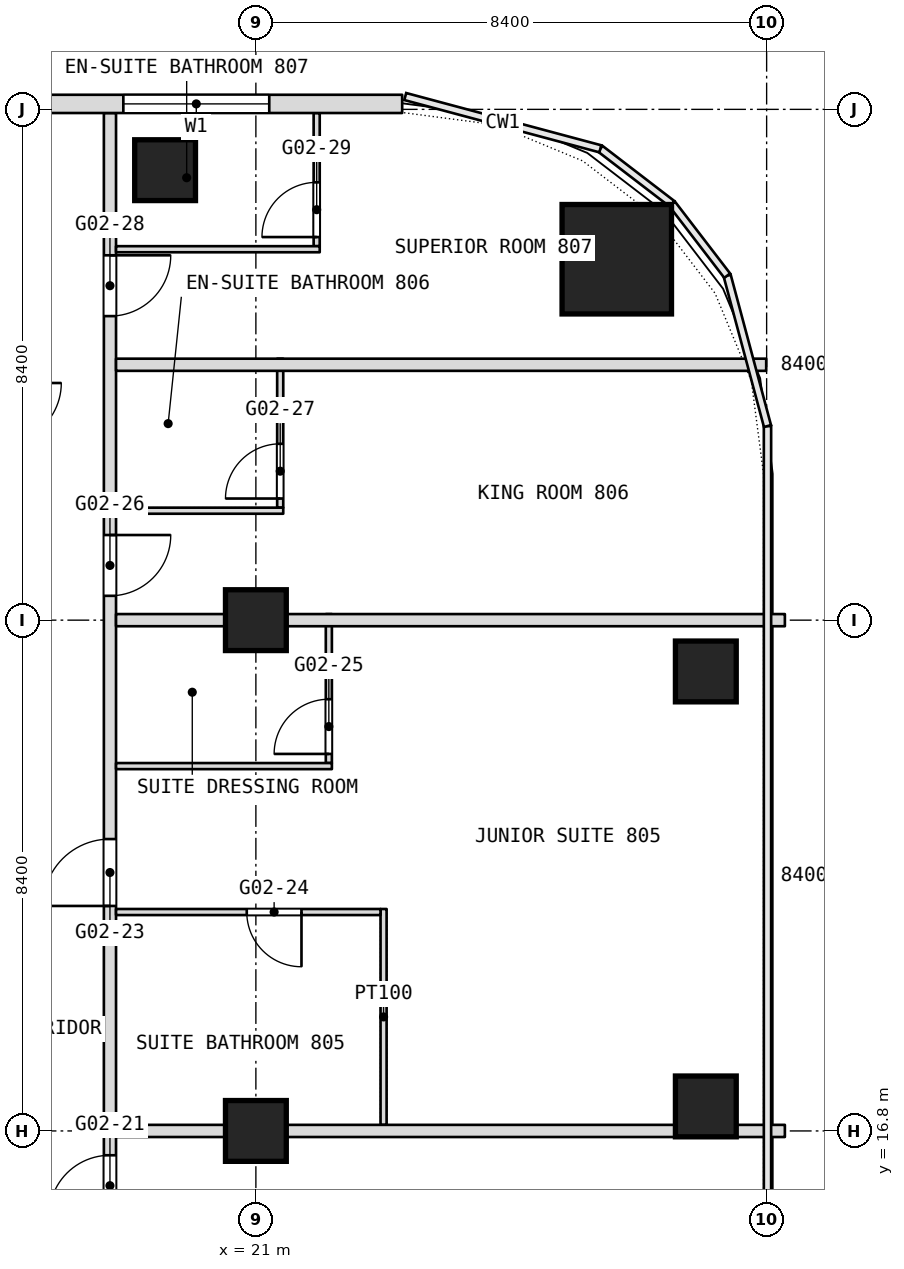
"""IFC4 building model, lengths in metres.
Left out: names, types, materials, properties, quantities, classifications, styles, units other than length and angle.
Written with IfcOpenShell. Run it as: python <this file> out.ifc"""

import sys

from ifc_helpers import new_model, si_unit, direction, frame, frame_2d, origin, origin_2d, place, context, subcontext, project, spatial, rectangle, extrude, element, fill, save


model = new_model("IFC4")
c1 = context("Model", 3, precision=1e-05, world=origin(), true_north=direction((0.0, 1.0)))
c2 = subcontext(c1, "Body", "Model", "MODEL_VIEW")
j1 = project(units=[si_unit("LENGTHUNIT", "METRE"), si_unit("PLANEANGLEUNIT", "RADIAN")], contexts=[c1])
p1 = place(None, origin())
s1 = spatial("IfcSite", under=j1, at=p1, CompositionType="ELEMENT")
p2 = place(p1, origin())
s2 = spatial("IfcBuilding", under=s1, at=p2, CompositionType="ELEMENT")
p3 = place(p2, frame((0.0, 0.0, 43.7)))
s3 = spatial("IfcBuildingStorey", under=s2, at=p3, CompositionType="ELEMENT", Elevation=43.7)
p4 = place(p3, frame((26.936, 31.135, 0.0), z_axis=(0.0, 0.0, 1.0), x_axis=(1.0, 0.0, 0.0)))
e1 = element("IfcColumn", 1, at=p4, inside=s3, PredefinedType="COLUMN", context=c2, shape_type="SweptSolid", body=[
    extrude(rectangle(XDim=1.8, YDim=1.8, at=origin_2d()), origin(), (0.0, 0.0, 1.0), 3.6),
])
for number, where, z_axis, x_axis in (
    (2, (21.0, 16.8, 0.0), (0.0, 0.0, 1.0), (1.0, 0.0, 0.0)),
    (3, (21.0, 25.2, 0.0), (0.0, 0.0, 1.0), (1.0, 0.0, 0.0)),
    (4, (19.507, 32.6, 0.0), (0.0, 0.0, 1.0), (1.0, 0.0, 0.0)),
    (5, (28.4, 24.356, 0.0), (0.0, 0.0, 1.0), (1.0, 0.0, 0.0)),
    (6, (28.4, 17.203, 0.0), (0.0, 0.0, 1.0), (1.0, 0.0, 0.0)),
):
    element("IfcColumn", number, at=place(p3, frame(where, z_axis=z_axis, x_axis=x_axis)), inside=s3, PredefinedType="COLUMN", context=c2, shape_type="SweptSolid", body=[
        extrude(rectangle(XDim=1.0, YDim=1.0, at=origin_2d()), origin(), (0.0, 0.0, 1.0), 3.6),
    ])
p5 = place(p3, frame((23.1, 16.9, 0.0), z_axis=(0.0, 0.0, 1.0), x_axis=(0.0, 1.0, 0.0)))
e7 = element("IfcWall", 7, at=p5, inside=s3, PredefinedType="PARTITIONING", context=c2, shape_type="SweptSolid", body=[
    extrude(rectangle(XDim=3.55, YDim=0.1, at=frame_2d((1.775, 0.0))), origin(), (0.0, 0.0, 1.0), 3.34),
])
p6 = place(p3, frame((22.2, 22.85, 0.0), z_axis=(0.0, 0.0, 1.0), x_axis=(0.0, 1.0, 0.0)))
e8 = element("IfcWall", 8, at=p6, inside=s3, PredefinedType="PARTITIONING", context=c2, shape_type="SweptSolid", body=[
    extrude(rectangle(XDim=2.45, YDim=0.1, at=frame_2d((1.225, 0.0))), origin(), (0.0, 0.0, 1.0), 3.34),
])
p7 = place(p6, frame((0.15, 0.0, 0.0)))
e9 = element("IfcOpeningElement", 9, at=p7, cuts=e8, PredefinedType="OPENING", context=c2, shape_type="SweptSolid", body=[
    extrude(rectangle(XDim=0.9, YDim=2.1, at=frame_2d((0.45, 1.05))), frame((0.0, 0.05, 0.0), z_axis=(0.0, -1.0, 0.0), x_axis=(1.0, 0.0, 0.0)), (0.0, 0.0, 1.0), 0.1),
])
p8 = place(p3, frame((22.0, 31.35, 0.0), z_axis=(0.0, 0.0, 1.0), x_axis=(0.0, 1.0, 0.0)))
e10 = element("IfcWall", 10, at=p8, inside=s3, PredefinedType="PARTITIONING", context=c2, shape_type="SweptSolid", body=[
    extrude(rectangle(XDim=2.19, YDim=0.1, at=frame_2d((1.095, 0.0))), origin(), (0.0, 0.0, 1.0), 3.34),
])
p9 = place(p8, frame((0.15, 0.0, 0.0)))
e11 = element("IfcOpeningElement", 11, at=p9, cuts=e10, PredefinedType="OPENING", context=c2, shape_type="SweptSolid", body=[
    extrude(rectangle(XDim=0.9, YDim=2.1, at=frame_2d((0.45, 1.05))), frame((0.0, 0.05, 0.0), z_axis=(0.0, -1.0, 0.0), x_axis=(1.0, 0.0, 0.0)), (0.0, 0.0, 1.0), 0.1),
])
p10 = place(p3, frame((21.4, 27.05, 0.0), z_axis=(0.0, 0.0, 1.0), x_axis=(0.0, 1.0, 0.0)))
e12 = element("IfcWall", 12, at=p10, inside=s3, PredefinedType="PARTITIONING", context=c2, shape_type="SweptSolid", body=[
    extrude(rectangle(XDim=2.45, YDim=0.1, at=frame_2d((1.225, 0.0))), origin(), (0.0, 0.0, 1.0), 3.34),
])
p11 = place(p10, frame((0.15, 0.0, 0.0)))
e13 = element("IfcOpeningElement", 13, at=p11, cuts=e12, PredefinedType="OPENING", context=c2, shape_type="SweptSolid", body=[
    extrude(rectangle(XDim=0.9, YDim=2.1, at=frame_2d((0.45, 1.05))), frame((0.0, 0.05, 0.0), z_axis=(0.0, -1.0, 0.0), x_axis=(1.0, 0.0, 0.0)), (0.0, 0.0, 1.0), 0.1),
])
p12 = place(p3, frame((18.6, -16.665, 0.0), z_axis=(0.0, 0.0, 1.0), x_axis=(0.0, 1.0, 0.0)))
e14 = element("IfcWall", 14, at=p12, inside=s3, PredefinedType="PARTITIONING", context=c2, shape_type="SweptSolid", body=[
    extrude(rectangle(XDim=50.205, YDim=0.2, at=frame_2d((25.103, 0.0))), origin(), (0.0, 0.0, 1.0), 3.34),
])
p13 = place(p12, frame((4.0, 0.0, 0.0)))
e15 = element("IfcOpeningElement", 15, at=p13, cuts=e14, PredefinedType="OPENING", context=c2, shape_type="SweptSolid", body=[
    extrude(rectangle(XDim=1.1, YDim=2.1, at=frame_2d((0.55, 1.05))), frame((0.0, 0.1, 0.0), z_axis=(0.0, -1.0, 0.0), x_axis=(1.0, 0.0, 0.0)), (0.0, 0.0, 1.0), 0.2),
])
p14 = place(p12, frame((9.815, 0.0, 0.0)))
e16 = element("IfcOpeningElement", 16, at=p14, cuts=e14, PredefinedType="OPENING", context=c2, shape_type="SweptSolid", body=[
    extrude(rectangle(XDim=1.1, YDim=2.1, at=frame_2d((0.55, 1.05))), frame((0.0, 0.1, 0.0), z_axis=(0.0, -1.0, 0.0), x_axis=(1.0, 0.0, 0.0)), (0.0, 0.0, 1.0), 0.2),
])
p15 = place(p12, frame((19.965, 0.0, 0.0)))
e17 = element("IfcOpeningElement", 17, at=p15, cuts=e14, PredefinedType="OPENING", context=c2, shape_type="SweptSolid", body=[
    extrude(rectangle(XDim=1.8, YDim=2.1, at=frame_2d((0.9, 1.05))), frame((0.0, 0.1, 0.0), z_axis=(0.0, -1.0, 0.0), x_axis=(1.0, 0.0, 0.0)), (0.0, 0.0, 1.0), 0.2),
])
p16 = place(p12, frame((25.465, 0.0, 0.0)))
e18 = element("IfcOpeningElement", 18, at=p16, cuts=e14, PredefinedType="OPENING", context=c2, shape_type="SweptSolid", body=[
    extrude(rectangle(XDim=1.0, YDim=2.1, at=frame_2d((0.5, 1.05))), frame((0.0, 0.1, 0.0), z_axis=(0.0, -1.0, 0.0), x_axis=(1.0, 0.0, 0.0)), (0.0, 0.0, 1.0), 0.2),
])
p17 = place(p12, frame((32.065, 0.0, 0.0)))
e19 = element("IfcOpeningElement", 19, at=p17, cuts=e14, PredefinedType="OPENING", context=c2, shape_type="SweptSolid", body=[
    extrude(rectangle(XDim=1.0, YDim=2.1, at=frame_2d((0.5, 1.05))), frame((0.0, 0.1, 0.0), z_axis=(0.0, -1.0, 0.0), x_axis=(1.0, 0.0, 0.0)), (0.0, 0.0, 1.0), 0.2),
])
p18 = place(p12, frame((37.165, 0.0, 0.0)))
e20 = element("IfcOpeningElement", 20, at=p18, cuts=e14, PredefinedType="OPENING", context=c2, shape_type="SweptSolid", body=[
    extrude(rectangle(XDim=1.1, YDim=2.1, at=frame_2d((0.55, 1.05))), frame((0.0, 0.1, 0.0), z_axis=(0.0, -1.0, 0.0), x_axis=(1.0, 0.0, 0.0)), (0.0, 0.0, 1.0), 0.2),
])
p19 = place(p12, frame((42.265, 0.0, 0.0)))
e21 = element("IfcOpeningElement", 21, at=p19, cuts=e14, PredefinedType="OPENING", context=c2, shape_type="SweptSolid", body=[
    extrude(rectangle(XDim=1.0, YDim=2.1, at=frame_2d((0.5, 1.05))), frame((0.0, 0.1, 0.0), z_axis=(0.0, -1.0, 0.0), x_axis=(1.0, 0.0, 0.0)), (0.0, 0.0, 1.0), 0.2),
])
p20 = place(p12, frame((46.865, 0.0, 0.0)))
e22 = element("IfcOpeningElement", 22, at=p20, cuts=e14, PredefinedType="OPENING", context=c2, shape_type="SweptSolid", body=[
    extrude(rectangle(XDim=1.0, YDim=2.1, at=frame_2d((0.5, 1.05))), frame((0.0, 0.1, 0.0), z_axis=(0.0, -1.0, 0.0), x_axis=(1.0, 0.0, 0.0)), (0.0, 0.0, 1.0), 0.2),
])
p21 = place(p3, frame((18.7, 16.8, 0.0), z_axis=(0.0, 0.0, 1.0), x_axis=(1.0, 0.0, 0.0)))
e23 = element("IfcWall", 23, at=p21, inside=s3, PredefinedType="PARTITIONING", context=c2, shape_type="SweptSolid", body=[
    extrude(rectangle(XDim=11.0, YDim=0.2, at=frame_2d((5.5, 0.0))), origin(), (0.0, 0.0, 1.0), 2.84),
])
p22 = place(p3, frame((18.7, 20.4, 0.0), z_axis=(0.0, 0.0, 1.0), x_axis=(1.0, 0.0, 0.0)))
e24 = element("IfcWall", 24, at=p22, inside=s3, PredefinedType="PARTITIONING", context=c2, shape_type="SweptSolid", body=[
    extrude(rectangle(XDim=4.35, YDim=0.1, at=frame_2d((2.175, 0.0))), origin(), (0.0, 0.0, 1.0), 3.34),
])
p23 = place(p22, frame((2.15, 0.0, 0.0)))
e25 = element("IfcOpeningElement", 25, at=p23, cuts=e24, PredefinedType="OPENING", context=c2, shape_type="SweptSolid", body=[
    extrude(rectangle(XDim=0.9, YDim=2.1, at=frame_2d((0.45, 1.05))), frame((0.0, 0.05, 0.0), z_axis=(0.0, -1.0, 0.0), x_axis=(1.0, 0.0, 0.0)), (0.0, 0.0, 1.0), 0.1),
])
p24 = place(p3, frame((18.7, 22.8, 0.0), z_axis=(0.0, 0.0, 1.0), x_axis=(1.0, 0.0, 0.0)))
e26 = element("IfcWall", 26, at=p24, inside=s3, PredefinedType="PARTITIONING", context=c2, shape_type="SweptSolid", body=[
    extrude(rectangle(XDim=3.55, YDim=0.1, at=frame_2d((1.775, 0.0))), origin(), (0.0, 0.0, 1.0), 3.34),
])
p25 = place(p3, frame((18.7, 25.2, 0.0), z_axis=(0.0, 0.0, 1.0), x_axis=(1.0, 0.0, 0.0)))
e27 = element("IfcWall", 27, at=p25, inside=s3, PredefinedType="PARTITIONING", context=c2, shape_type="SweptSolid", body=[
    extrude(rectangle(XDim=11.0, YDim=0.2, at=frame_2d((5.5, 0.0))), origin(), (0.0, 0.0, 1.0), 2.84),
])
p26 = place(p3, frame((18.7, 27.0, 0.0), z_axis=(0.0, 0.0, 1.0), x_axis=(1.0, 0.0, 0.0)))
e28 = element("IfcWall", 28, at=p26, inside=s3, PredefinedType="PARTITIONING", context=c2, shape_type="SweptSolid", body=[
    extrude(rectangle(XDim=2.75, YDim=0.1, at=frame_2d((1.375, 0.0))), origin(), (0.0, 0.0, 1.0), 3.34),
])
p27 = place(p3, frame((18.7, 29.4, 0.0), z_axis=(0.0, 0.0, 1.0), x_axis=(1.0, 0.0, 0.0)))
e29 = element("IfcWall", 29, at=p27, inside=s3, PredefinedType="PARTITIONING", context=c2, shape_type="SweptSolid", body=[
    extrude(rectangle(XDim=10.693, YDim=0.2, at=frame_2d((5.347, 0.0))), origin(), (0.0, 0.0, 1.0), 3.34),
])
p28 = place(p3, frame((18.7, 31.3, 0.0), z_axis=(0.0, 0.0, 1.0), x_axis=(1.0, 0.0, 0.0)))
e30 = element("IfcWall", 30, at=p28, inside=s3, PredefinedType="PARTITIONING", context=c2, shape_type="SweptSolid", body=[
    extrude(rectangle(XDim=3.35, YDim=0.1, at=frame_2d((1.675, 0.0))), origin(), (0.0, 0.0, 1.0), 3.34),
])
p29 = place(p3, frame((23.406, 33.69, 0.0), z_axis=(0.0, 0.0, 1.0), x_axis=(-1.0, 0.0, 0.0)))
e31 = element("IfcWall", 31, at=p29, inside=s3, PredefinedType="NOTDEFINED", context=c2, shape_type="SweptSolid", body=[
    extrude(rectangle(XDim=46.812, YDim=0.3, at=frame_2d((23.406, 0.0))), origin(), (0.0, 0.0, 1.0), 3.6),
])
p30 = place(p29, frame((2.186, 0.0, 0.9)))
e32 = element("IfcOpeningElement", 32, at=p30, cuts=e31, PredefinedType="OPENING", context=c2, shape_type="SweptSolid", body=[
    extrude(rectangle(XDim=2.4, YDim=2.1, at=frame_2d((1.2, 1.05))), frame((0.0, 0.15, 0.0), z_axis=(0.0, -1.0, 0.0), x_axis=(1.0, 0.0, 0.0)), (0.0, 0.0, 1.0), 0.3),
])
p31 = place(p29, frame((7.506, 0.0, 0.9)))
e33 = element("IfcOpeningElement", 33, at=p31, cuts=e31, PredefinedType="OPENING", context=c2, shape_type="SweptSolid", body=[
    extrude(rectangle(XDim=2.4, YDim=2.1, at=frame_2d((1.2, 1.05))), frame((0.0, 0.15, 0.0), z_axis=(0.0, -1.0, 0.0), x_axis=(1.0, 0.0, 0.0)), (0.0, 0.0, 1.0), 0.3),
])
p32 = place(p29, frame((11.706, 0.0, 0.9)))
e34 = element("IfcOpeningElement", 34, at=p32, cuts=e31, PredefinedType="OPENING", context=c2, shape_type="SweptSolid", body=[
    extrude(rectangle(XDim=2.4, YDim=2.1, at=frame_2d((1.2, 1.05))), frame((0.0, 0.15, 0.0), z_axis=(0.0, -1.0, 0.0), x_axis=(1.0, 0.0, 0.0)), (0.0, 0.0, 1.0), 0.3),
])
p33 = place(p29, frame((15.906, 0.0, 0.9)))
e35 = element("IfcOpeningElement", 35, at=p33, cuts=e31, PredefinedType="OPENING", context=c2, shape_type="SweptSolid", body=[
    extrude(rectangle(XDim=2.4, YDim=2.1, at=frame_2d((1.2, 1.05))), frame((0.0, 0.15, 0.0), z_axis=(0.0, -1.0, 0.0), x_axis=(1.0, 0.0, 0.0)), (0.0, 0.0, 1.0), 0.3),
])
p34 = place(p29, frame((20.106, 0.0, 0.9)))
e36 = element("IfcOpeningElement", 36, at=p34, cuts=e31, PredefinedType="OPENING", context=c2, shape_type="SweptSolid", body=[
    extrude(rectangle(XDim=2.4, YDim=2.1, at=frame_2d((1.2, 1.05))), frame((0.0, 0.15, 0.0), z_axis=(0.0, -1.0, 0.0), x_axis=(1.0, 0.0, 0.0)), (0.0, 0.0, 1.0), 0.3),
])
p35 = place(p29, frame((24.306, 0.0, 0.9)))
e37 = element("IfcOpeningElement", 37, at=p35, cuts=e31, PredefinedType="OPENING", context=c2, shape_type="SweptSolid", body=[
    extrude(rectangle(XDim=2.4, YDim=2.1, at=frame_2d((1.2, 1.05))), frame((0.0, 0.15, 0.0), z_axis=(0.0, -1.0, 0.0), x_axis=(1.0, 0.0, 0.0)), (0.0, 0.0, 1.0), 0.3),
])
p36 = place(p29, frame((28.506, 0.0, 0.9)))
e38 = element("IfcOpeningElement", 38, at=p36, cuts=e31, PredefinedType="OPENING", context=c2, shape_type="SweptSolid", body=[
    extrude(rectangle(XDim=2.4, YDim=2.1, at=frame_2d((1.2, 1.05))), frame((0.0, 0.15, 0.0), z_axis=(0.0, -1.0, 0.0), x_axis=(1.0, 0.0, 0.0)), (0.0, 0.0, 1.0), 0.3),
])
p37 = place(p29, frame((32.706, 0.0, 0.9)))
e39 = element("IfcOpeningElement", 39, at=p37, cuts=e31, PredefinedType="OPENING", context=c2, shape_type="SweptSolid", body=[
    extrude(rectangle(XDim=2.4, YDim=2.1, at=frame_2d((1.2, 1.05))), frame((0.0, 0.15, 0.0), z_axis=(0.0, -1.0, 0.0), x_axis=(1.0, 0.0, 0.0)), (0.0, 0.0, 1.0), 0.3),
])
p38 = place(p29, frame((36.906, 0.0, 0.9)))
e40 = element("IfcOpeningElement", 40, at=p38, cuts=e31, PredefinedType="OPENING", context=c2, shape_type="SweptSolid", body=[
    extrude(rectangle(XDim=2.4, YDim=2.1, at=frame_2d((1.2, 1.05))), frame((0.0, 0.15, 0.0), z_axis=(0.0, -1.0, 0.0), x_axis=(1.0, 0.0, 0.0)), (0.0, 0.0, 1.0), 0.3),
])
p39 = place(p29, frame((42.226, 0.0, 0.9)))
e41 = element("IfcOpeningElement", 41, at=p39, cuts=e31, PredefinedType="OPENING", context=c2, shape_type="SweptSolid", body=[
    extrude(rectangle(XDim=2.4, YDim=2.1, at=frame_2d((1.2, 1.05))), frame((0.0, 0.15, 0.0), z_axis=(0.0, -1.0, 0.0), x_axis=(1.0, 0.0, 0.0)), (0.0, 0.0, 1.0), 0.3),
])
p40 = place(p7, origin())
e42 = element("IfcDoor", 42, at=p40, inside=s3, OperationType="SINGLE_SWING_LEFT", PredefinedType="DOOR", context=c2, shape_type="SweptSolid", body=[
    extrude(rectangle(XDim=0.9, YDim=2.1, at=frame_2d((0.45, 1.05))), frame((0.0, 0.025, 0.0), z_axis=(0.0, -1.0, 0.0), x_axis=(1.0, 0.0, 0.0)), (0.0, 0.0, 1.0), 0.05),
])
fill(e9, e42)
p41 = place(p9, origin())
e43 = element("IfcDoor", 43, at=p41, inside=s3, OperationType="SINGLE_SWING_LEFT", PredefinedType="DOOR", context=c2, shape_type="SweptSolid", body=[
    extrude(rectangle(XDim=0.9, YDim=2.1, at=frame_2d((0.45, 1.05))), frame((0.0, 0.025, 0.0), z_axis=(0.0, -1.0, 0.0), x_axis=(1.0, 0.0, 0.0)), (0.0, 0.0, 1.0), 0.05),
])
fill(e11, e43)
p42 = place(p11, origin())
e44 = element("IfcDoor", 44, at=p42, inside=s3, OperationType="SINGLE_SWING_LEFT", PredefinedType="DOOR", context=c2, shape_type="SweptSolid", body=[
    extrude(rectangle(XDim=0.9, YDim=2.1, at=frame_2d((0.45, 1.05))), frame((0.0, 0.025, 0.0), z_axis=(0.0, -1.0, 0.0), x_axis=(1.0, 0.0, 0.0)), (0.0, 0.0, 1.0), 0.05),
])
fill(e13, e44)
p43 = place(p17, origin())
e45 = element("IfcDoor", 45, at=p43, inside=s3, OperationType="SINGLE_SWING_LEFT", PredefinedType="DOOR", context=c2, shape_type="SweptSolid", body=[
    extrude(rectangle(XDim=1.0, YDim=2.1, at=frame_2d((0.5, 1.05))), frame((0.0, 0.025, 0.0), z_axis=(0.0, -1.0, 0.0), x_axis=(1.0, 0.0, 0.0)), (0.0, 0.0, 1.0), 0.05),
])
fill(e19, e45)
p44 = place(p18, origin())
e46 = element("IfcDoor", 46, at=p44, inside=s3, OperationType="SINGLE_SWING_RIGHT", PredefinedType="DOOR", context=c2, shape_type="SweptSolid", body=[
    extrude(rectangle(XDim=1.1, YDim=2.1, at=frame_2d((0.55, 1.05))), frame((0.0, 0.025, 0.0), z_axis=(0.0, -1.0, 0.0), x_axis=(1.0, 0.0, 0.0)), (0.0, 0.0, 1.0), 0.05),
])
fill(e20, e46)
p45 = place(p19, origin())
e47 = element("IfcDoor", 47, at=p45, inside=s3, OperationType="SINGLE_SWING_RIGHT", PredefinedType="DOOR", context=c2, shape_type="SweptSolid", body=[
    extrude(rectangle(XDim=1.0, YDim=2.1, at=frame_2d((0.5, 1.05))), frame((0.0, 0.025, 0.0), z_axis=(0.0, -1.0, 0.0), x_axis=(1.0, 0.0, 0.0)), (0.0, 0.0, 1.0), 0.05),
])
fill(e21, e47)
p46 = place(p20, origin())
e48 = element("IfcDoor", 48, at=p46, inside=s3, OperationType="SINGLE_SWING_LEFT", PredefinedType="DOOR", context=c2, shape_type="SweptSolid", body=[
    extrude(rectangle(XDim=1.0, YDim=2.1, at=frame_2d((0.5, 1.05))), frame((0.0, 0.025, 0.0), z_axis=(0.0, -1.0, 0.0), x_axis=(1.0, 0.0, 0.0)), (0.0, 0.0, 1.0), 0.05),
])
fill(e22, e48)
p47 = place(p23, origin())
e49 = element("IfcDoor", 49, at=p47, inside=s3, OperationType="SINGLE_SWING_LEFT", PredefinedType="DOOR", context=c2, shape_type="SweptSolid", body=[
    extrude(rectangle(XDim=0.9, YDim=2.1, at=frame_2d((0.45, 1.05))), frame((0.0, 0.025, 0.0), z_axis=(0.0, -1.0, 0.0), x_axis=(1.0, 0.0, 0.0)), (0.0, 0.0, 1.0), 0.05),
])
fill(e25, e49)
p48 = place(p30, origin())
e50 = element("IfcWindow", 50, at=p48, inside=s3, PartitioningType="SINGLE_PANEL", PredefinedType="WINDOW", context=c2, shape_type="SweptSolid", body=[
    extrude(rectangle(XDim=2.4, YDim=2.1, at=frame_2d((1.2, 1.05))), frame((0.0, 0.03, 0.0), z_axis=(0.0, -1.0, 0.0), x_axis=(1.0, 0.0, 0.0)), (0.0, 0.0, 1.0), 0.06),
])
fill(e32, e50)
save(model, sys.argv[1])
